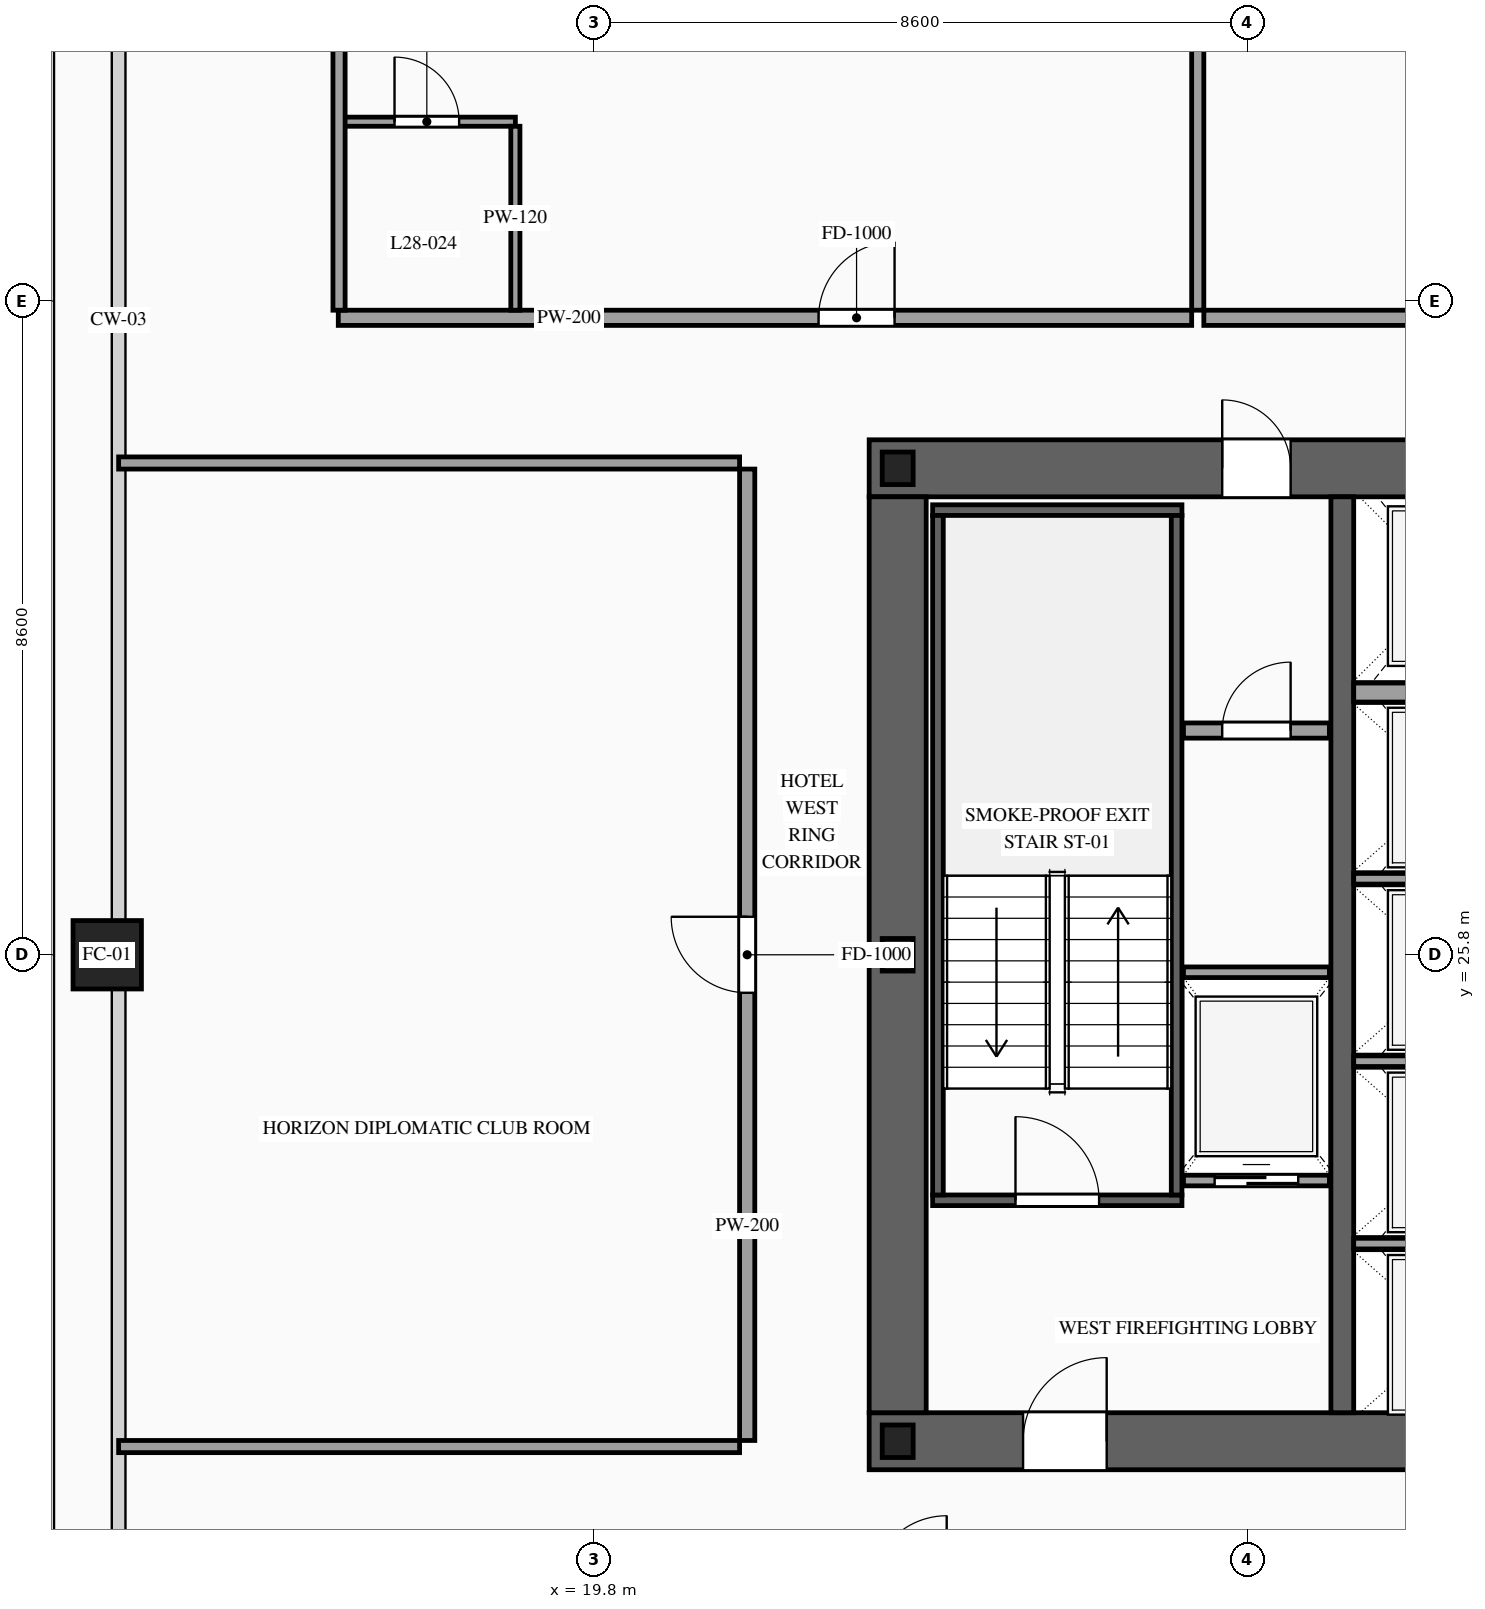
"""IFC4 building model, lengths in metres.
Left out: names, types, materials, properties, quantities, classifications, styles, units other than length and angle.
Written with IfcOpenShell. Run it as: python <this file> out.ifc"""

import sys

from ifc_helpers import new_model, si_unit, direction, frame, frame_2d, origin, origin_2d, place, context, subcontext, project, spatial, rectangle, hollow_rectangle, i_section, extrude, source, transform, mapped, element, fill, save


model = new_model("IFC4")
c1 = context("Model", 3, precision=1e-05, world=origin(), true_north=direction((0.0, 1.0)))
c2 = subcontext(c1, "Body", "Model", "MODEL_VIEW")
j1 = project(units=[si_unit("LENGTHUNIT", "METRE"), si_unit("PLANEANGLEUNIT", "RADIAN")], contexts=[c1])
p1 = place(None, origin())
s1 = spatial("IfcSite", under=j1, at=p1, CompositionType="ELEMENT")
p2 = place(p1, origin())
s2 = spatial("IfcBuilding", under=s1, at=p2, CompositionType="ELEMENT")
p3 = place(p2, frame((0.0, 0.0, 108.2)))
s3 = spatial("IfcBuildingStorey", under=s2, at=p3, CompositionType="ELEMENT", Elevation=108.2)
p4 = place(p3, frame((23.425, 19.4, 0.0), z_axis=(0.0, 0.0, 1.0), x_axis=(1.0, 0.0, 0.0)))
e1 = element("IfcWall", 1, at=p4, inside=s3, PredefinedType="SHEAR", context=c2, shape_type="SweptSolid", body=[
    extrude(rectangle(XDim=27.15, YDim=0.75, at=frame_2d((13.575, 0.0))), origin(), (0.0, 0.0, 1.0), 3.6),
])
p5 = place(p4, frame((2.025, 0.0, 0.0)))
e2 = element("IfcOpeningElement", 2, at=p5, cuts=e1, PredefinedType="OPENING", context=c2, shape_type="SweptSolid", body=[
    extrude(rectangle(XDim=1.1, YDim=2.2, at=frame_2d((0.55, 1.1))), frame((0.0, 0.39, 0.0), z_axis=(0.0, -1.0, 0.0), x_axis=(1.0, 0.0, 0.0)), (0.0, 0.0, 1.0), 0.78),
])
p6 = place(p4, frame((9.925, 0.0, 0.0)))
e3 = element("IfcOpeningElement", 3, at=p6, cuts=e1, PredefinedType="OPENING", context=c2, shape_type="SweptSolid", body=[
    extrude(rectangle(XDim=1.1, YDim=2.2, at=frame_2d((0.55, 1.1))), frame((0.0, 0.39, 0.0), z_axis=(0.0, -1.0, 0.0), x_axis=(1.0, 0.0, 0.0)), (0.0, 0.0, 1.0), 0.78),
])
p7 = place(p4, frame((23.125, 0.0, 0.0)))
e4 = element("IfcOpeningElement", 4, at=p7, cuts=e1, PredefinedType="OPENING", context=c2, shape_type="SweptSolid", body=[
    extrude(rectangle(XDim=1.1, YDim=2.2, at=frame_2d((0.55, 1.1))), frame((0.0, 0.39, 0.0), z_axis=(0.0, -1.0, 0.0), x_axis=(1.0, 0.0, 0.0)), (0.0, 0.0, 1.0), 0.78),
])
p8 = place(p4, frame((19.745, 0.0, 0.0)))
e5 = element("IfcOpeningElement", 5, at=p8, cuts=e1, PredefinedType="OPENING", context=c2, shape_type="SweptSolid", body=[
    extrude(rectangle(XDim=0.9, YDim=2.15, at=frame_2d((0.45, 1.075))), frame((0.0, 0.39, 0.0), z_axis=(0.0, -1.0, 0.0), x_axis=(1.0, 0.0, 0.0)), (0.0, 0.0, 1.0), 0.78),
])
p9 = place(p4, frame((18.305, 0.0, 0.0)))
e6 = element("IfcOpeningElement", 6, at=p9, cuts=e1, PredefinedType="OPENING", context=c2, shape_type="SweptSolid", body=[
    extrude(rectangle(XDim=0.9, YDim=2.15, at=frame_2d((0.45, 1.075))), frame((0.0, 0.39, 0.0), z_axis=(0.0, -1.0, 0.0), x_axis=(1.0, 0.0, 0.0)), (0.0, 0.0, 1.0), 0.78),
])
p10 = place(p3, frame((23.425, 32.2, 0.0), z_axis=(0.0, 0.0, 1.0), x_axis=(1.0, 0.0, 0.0)))
e7 = element("IfcWall", 7, at=p10, inside=s3, PredefinedType="SHEAR", context=c2, shape_type="SweptSolid", body=[
    extrude(rectangle(XDim=27.15, YDim=0.75, at=frame_2d((13.575, 0.0))), origin(), (0.0, 0.0, 1.0), 3.6),
])
p11 = place(p10, frame((4.645, 0.0, 0.0)))
e8 = element("IfcOpeningElement", 8, at=p11, cuts=e7, PredefinedType="OPENING", context=c2, shape_type="SweptSolid", body=[
    extrude(rectangle(XDim=0.9, YDim=2.15, at=frame_2d((0.45, 1.075))), frame((0.0, 0.39, 0.0), z_axis=(0.0, -1.0, 0.0), x_axis=(1.0, 0.0, 0.0)), (0.0, 0.0, 1.0), 0.78),
])
p12 = place(p10, frame((9.925, 0.0, 0.0)))
e9 = element("IfcOpeningElement", 9, at=p12, cuts=e7, PredefinedType="OPENING", context=c2, shape_type="SweptSolid", body=[
    extrude(rectangle(XDim=1.1, YDim=2.2, at=frame_2d((0.55, 1.1))), frame((0.0, 0.39, 0.0), z_axis=(0.0, -1.0, 0.0), x_axis=(1.0, 0.0, 0.0)), (0.0, 0.0, 1.0), 0.78),
])
p13 = place(p10, frame((15.775, 0.0, 0.0)))
e10 = element("IfcOpeningElement", 10, at=p13, cuts=e7, PredefinedType="OPENING", context=c2, shape_type="SweptSolid", body=[
    extrude(rectangle(XDim=1.1, YDim=2.2, at=frame_2d((0.55, 1.1))), frame((0.0, 0.39, 0.0), z_axis=(0.0, -1.0, 0.0), x_axis=(1.0, 0.0, 0.0)), (0.0, 0.0, 1.0), 0.78),
])
p14 = place(p10, frame((19.745, 0.0, 0.0)))
e11 = element("IfcOpeningElement", 11, at=p14, cuts=e7, PredefinedType="OPENING", context=c2, shape_type="SweptSolid", body=[
    extrude(rectangle(XDim=0.9, YDim=2.15, at=frame_2d((0.45, 1.075))), frame((0.0, 0.39, 0.0), z_axis=(0.0, -1.0, 0.0), x_axis=(1.0, 0.0, 0.0)), (0.0, 0.0, 1.0), 0.78),
])
m1 = source(origin(), c2, "Body", "SweptSolid", [
    extrude(rectangle(XDim=12.05, YDim=0.75, at=frame_2d((6.025, 0.0))), origin(), (0.0, 0.0, 1.0), 3.6),
])
p15 = place(p3, frame((23.8, 19.775, 0.0), z_axis=(0.0, 0.0, 1.0), x_axis=(0.0, 1.0, 0.0)))
e12 = element("IfcWall", 12, at=p15, inside=s3, PredefinedType="SHEAR", context=c2, shape_type="MappedRepresentation", body=[
    mapped(m1, transform((0.0, 0.0, 0.0), scale=1.0)),
])
m2 = source(origin(), c2, "Body", "SweptSolid", [
    extrude(rectangle(XDim=12.05, YDim=0.3, at=frame_2d((6.025, 0.0))), origin(), (0.0, 0.0, 1.0), 3.6),
])
p16 = place(p3, frame((29.65, 19.775, 0.0), z_axis=(0.0, 0.0, 1.0), x_axis=(0.0, 1.0, 0.0)))
e13 = element("IfcWall", 13, at=p16, inside=s3, PredefinedType="SOLIDWALL", context=c2, shape_type="MappedRepresentation", body=[
    mapped(m2, transform((0.0, 0.0, 0.0), scale=1.0)),
])
m3 = source(origin(), c2, "Body", "SweptSolid", [
    extrude(i_section(OverallWidth=0.407, OverallDepth=0.428, WebThickness=0.02, FlangeThickness=0.035, at=origin_2d()), origin(), (0.0, 0.0, 1.0), 3.6),
])
for number, where, z_axis, x_axis in (
    (14, (23.8, 19.4, 0.0), (0.0, 0.0, 1.0), (1.0, 0.0, 0.0)),
    (15, (23.8, 25.8, 0.0), (0.0, 0.0, 1.0), (1.0, 0.0, 0.0)),
    (16, (23.8, 32.2, 0.0), (0.0, 0.0, 1.0), (1.0, 0.0, 0.0)),
):
    element("IfcColumn", number, at=place(p3, frame(where, z_axis=z_axis, x_axis=x_axis)), inside=s3, PredefinedType="COLUMN", context=c2, shape_type="MappedRepresentation", body=[
        mapped(m3, transform((0.0, 0.0, 0.0), scale=1.0)),
    ])
m4 = source(origin(), c2, "Body", "SweptSolid", [
    extrude(hollow_rectangle(XDim=0.9, YDim=0.9, WallThickness=0.042, at=origin_2d()), origin(), (0.0, 0.0, 1.0), 3.6),
])
p17 = place(p3, frame((13.4, 25.8, 0.0), z_axis=(0.0, 0.0, 1.0), x_axis=(1.0, 0.0, 0.0)))
e17 = element("IfcColumn", 17, at=p17, inside=s3, PredefinedType="COLUMN", context=c2, shape_type="MappedRepresentation", body=[
    mapped(m4, transform((0.0, 0.0, 0.0), scale=1.0)),
])
p18 = place(p3, frame((27.56, 22.83, 0.0), z_axis=(0.0, 0.0, 1.0), x_axis=(1.0, 0.0, 0.0)))
e18 = element("IfcWall", 18, at=p18, inside=s3, PredefinedType="SOLIDWALL", context=c2, shape_type="SweptSolid", body=[
    extrude(rectangle(XDim=1.92, YDim=0.14, at=frame_2d((0.96, 0.0))), origin(), (0.0, 0.0, 1.0), 3.38),
])
p19 = place(p18, frame((0.41, 0.0, 0.0)))
e19 = element("IfcOpeningElement", 19, at=p19, cuts=e18, PredefinedType="OPENING", context=c2, shape_type="SweptSolid", body=[
    extrude(rectangle(XDim=1.1, YDim=2.2, at=frame_2d((0.55, 1.1))), frame((0.0, 0.085, 0.0), z_axis=(0.0, -1.0, 0.0), x_axis=(1.0, 0.0, 0.0)), (0.0, 0.0, 1.0), 0.17),
])
m5 = source(origin(), c2, "Body", "SweptSolid", [
    extrude(rectangle(XDim=1.92, YDim=0.14, at=frame_2d((0.96, 0.0))), origin(), (0.0, 0.0, 1.0), 3.38),
])
p20 = place(p3, frame((27.56, 25.57, 0.0), z_axis=(0.0, 0.0, 1.0), x_axis=(1.0, 0.0, 0.0)))
e20 = element("IfcWall", 20, at=p20, inside=s3, PredefinedType="SOLIDWALL", context=c2, shape_type="MappedRepresentation", body=[
    mapped(m5, transform((0.0, 0.0, 0.0), scale=1.0)),
])
m6 = source(origin(), c2, "Body", "SweptSolid", [
    extrude(rectangle(XDim=2.5, YDim=0.14, at=frame_2d((1.25, 0.0))), origin(), (0.0, 0.0, 1.0), 3.38),
])
for number, where, z_axis, x_axis in (
    (21, (29.8, 22.0, 0.0), (0.0, 0.0, 1.0), (1.0, 0.0, 0.0)),
    (22, (29.8, 24.4, 0.0), (0.0, 0.0, 1.0), (1.0, 0.0, 0.0)),
    (23, (29.8, 26.8, 0.0), (0.0, 0.0, 1.0), (1.0, 0.0, 0.0)),
):
    element("IfcWall", number, at=place(p3, frame(where, z_axis=z_axis, x_axis=x_axis)), inside=s3, PredefinedType="SOLIDWALL", context=c2, shape_type="MappedRepresentation", body=[
        mapped(m6, transform((0.0, 0.0, 0.0), scale=1.0)),
    ])
m7 = source(origin(), c2, "Body", "SweptSolid", [
    extrude(rectangle(XDim=2.5, YDim=0.25, at=frame_2d((1.25, 0.0))), origin(), (0.0, 0.0, 1.0), 3.38),
])
p21 = place(p3, frame((29.8, 29.25, 0.0), z_axis=(0.0, 0.0, 1.0), x_axis=(1.0, 0.0, 0.0)))
e24 = element("IfcWall", 24, at=p21, inside=s3, PredefinedType="SOLIDWALL", context=c2, shape_type="MappedRepresentation", body=[
    mapped(m7, transform((0.0, 0.0, 0.0), scale=1.0)),
])
p22 = place(p3, frame((24.26, 22.57, 0.0), z_axis=(0.0, 0.0, 1.0), x_axis=(1.0, 0.0, 0.0)))
e25 = element("IfcWall", 25, at=p22, inside=s3, PredefinedType="SOLIDWALL", context=c2, shape_type="SweptSolid", body=[
    extrude(rectangle(XDim=3.28, YDim=0.14, at=frame_2d((1.64, 0.0))), origin(), (0.0, 0.0, 1.0), 3.38),
])
p23 = place(p22, frame((1.09, 0.0, 0.0)))
e26 = element("IfcOpeningElement", 26, at=p23, cuts=e25, PredefinedType="OPENING", context=c2, shape_type="SweptSolid", body=[
    extrude(rectangle(XDim=1.1, YDim=2.2, at=frame_2d((0.55, 1.1))), frame((0.0, 0.085, 0.0), z_axis=(0.0, -1.0, 0.0), x_axis=(1.0, 0.0, 0.0)), (0.0, 0.0, 1.0), 0.17),
])
m8 = source(origin(), c2, "Body", "SweptSolid", [
    extrude(rectangle(XDim=3.28, YDim=0.14, at=frame_2d((1.64, 0.0))), origin(), (0.0, 0.0, 1.0), 3.38),
])
p24 = place(p3, frame((24.26, 31.65, 0.0), z_axis=(0.0, 0.0, 1.0), x_axis=(1.0, 0.0, 0.0)))
e27 = element("IfcWall", 27, at=p24, inside=s3, PredefinedType="SOLIDWALL", context=c2, shape_type="MappedRepresentation", body=[
    mapped(m8, transform((0.0, 0.0, 0.0), scale=1.0)),
])
m9 = source(origin(), c2, "Body", "SweptSolid", [
    extrude(rectangle(XDim=8.94, YDim=0.14, at=frame_2d((4.47, 0.0))), origin(), (0.0, 0.0, 1.0), 3.38),
])
for number, where, z_axis, x_axis in (
    (28, (24.33, 22.64, 0.0), (0.0, 0.0, 1.0), (0.0, 1.0, 0.0)),
    (29, (27.47, 22.64, 0.0), (0.0, 0.0, 1.0), (0.0, 1.0, 0.0)),
):
    element("IfcWall", number, at=place(p3, frame(where, z_axis=z_axis, x_axis=x_axis)), inside=s3, PredefinedType="SOLIDWALL", context=c2, shape_type="MappedRepresentation", body=[
        mapped(m9, transform((0.0, 0.0, 0.0), scale=1.0)),
    ])
p25 = place(p3, frame((27.56, 28.75, 0.0), z_axis=(0.0, 0.0, 1.0), x_axis=(1.0, 0.0, 0.0)))
e30 = element("IfcWall", 30, at=p25, inside=s3, PredefinedType="PARTITIONING", context=c2, shape_type="SweptSolid", body=[
    extrude(rectangle(XDim=1.92, YDim=0.2, at=frame_2d((0.96, 0.0))), origin(), (0.0, 0.0, 1.0), 3.38),
])
p26 = place(p25, frame((0.51, 0.0, 0.0)))
e31 = element("IfcOpeningElement", 31, at=p26, cuts=e30, PredefinedType="OPENING", context=c2, shape_type="SweptSolid", body=[
    extrude(rectangle(XDim=0.9, YDim=2.15, at=frame_2d((0.45, 1.075))), frame((0.0, 0.115, 0.0), z_axis=(0.0, -1.0, 0.0), x_axis=(1.0, 0.0, 0.0)), (0.0, 0.0, 1.0), 0.23),
])
p27 = place(p3, frame((16.44, 34.18, 0.0), z_axis=(0.0, 0.0, 1.0), x_axis=(1.0, 0.0, 0.0)))
e32 = element("IfcWall", 32, at=p27, inside=s3, PredefinedType="PARTITIONING", context=c2, shape_type="SweptSolid", body=[
    extrude(rectangle(XDim=11.228, YDim=0.2, at=frame_2d((5.614, 0.0))), origin(), (0.0, 0.0, 1.0), 3.38),
])
p28 = place(p27, frame((6.319, 0.0, 0.0)))
e33 = element("IfcOpeningElement", 33, at=p28, cuts=e32, PredefinedType="OPENING", context=c2, shape_type="SweptSolid", body=[
    extrude(rectangle(XDim=1.0, YDim=2.2, at=frame_2d((0.5, 1.1))), frame((0.0, 0.115, 0.0), z_axis=(0.0, -1.0, 0.0), x_axis=(1.0, 0.0, 0.0)), (0.0, 0.0, 1.0), 0.23),
])
m10 = source(origin(), c2, "Body", "SweptSolid", [
    extrude(rectangle(XDim=14.97, YDim=0.16, at=frame_2d((7.485, 0.0))), origin(), (0.0, 0.0, 1.0), 3.38),
])
p29 = place(p3, frame((27.748, 34.28, 0.0), z_axis=(0.0, 0.0, 1.0), x_axis=(0.0, 1.0, 0.0)))
e34 = element("IfcWall", 34, at=p29, inside=s3, PredefinedType="PARTITIONING", context=c2, shape_type="MappedRepresentation", body=[
    mapped(m10, transform((0.0, 0.0, 0.0), scale=1.0)),
])
p30 = place(p3, frame((16.44, 36.76, 0.0), z_axis=(0.0, 0.0, 1.0), x_axis=(1.0, 0.0, 0.0)))
e35 = element("IfcWall", 35, at=p30, inside=s3, PredefinedType="PARTITIONING", context=c2, shape_type="SweptSolid", body=[
    extrude(rectangle(XDim=2.33, YDim=0.12, at=frame_2d((1.165, 0.0))), origin(), (0.0, 0.0, 1.0), 3.38),
])
p31 = place(p30, frame((0.74, 0.0, 0.0)))
e36 = element("IfcOpeningElement", 36, at=p31, cuts=e35, PredefinedType="OPENING", context=c2, shape_type="SweptSolid", body=[
    extrude(rectangle(XDim=0.85, YDim=2.1, at=frame_2d((0.425, 1.05))), frame((0.0, 0.075, 0.0), z_axis=(0.0, -1.0, 0.0), x_axis=(1.0, 0.0, 0.0)), (0.0, 0.0, 1.0), 0.15),
])
m11 = source(origin(), c2, "Body", "SweptSolid", [
    extrude(rectangle(XDim=2.42, YDim=0.12, at=frame_2d((1.21, 0.0))), origin(), (0.0, 0.0, 1.0), 3.38),
])
p32 = place(p3, frame((18.77, 34.28, 0.0), z_axis=(0.0, 0.0, 1.0), x_axis=(0.0, 1.0, 0.0)))
e37 = element("IfcWall", 37, at=p32, inside=s3, PredefinedType="PARTITIONING", context=c2, shape_type="MappedRepresentation", body=[
    mapped(m11, transform((0.0, 0.0, 0.0), scale=1.0)),
])
p33 = place(p3, frame((27.828, 34.18, 0.0), z_axis=(0.0, 0.0, 1.0), x_axis=(1.0, 0.0, 0.0)))
e38 = element("IfcWall", 38, at=p33, inside=s3, PredefinedType="PARTITIONING", context=c2, shape_type="SweptSolid", body=[
    extrude(rectangle(XDim=9.092, YDim=0.2, at=frame_2d((4.546, 0.0))), origin(), (0.0, 0.0, 1.0), 3.38),
])
p34 = place(p33, frame((4.046, 0.0, 0.0)))
e39 = element("IfcOpeningElement", 39, at=p34, cuts=e38, PredefinedType="OPENING", context=c2, shape_type="SweptSolid", body=[
    extrude(rectangle(XDim=1.0, YDim=2.2, at=frame_2d((0.5, 1.1))), frame((0.0, 0.115, 0.0), z_axis=(0.0, -1.0, 0.0), x_axis=(1.0, 0.0, 0.0)), (0.0, 0.0, 1.0), 0.23),
])
m12 = source(origin(), c2, "Body", "SweptSolid", [
    extrude(rectangle(XDim=14.82, YDim=0.16, at=frame_2d((7.41, 0.0))), origin(), (0.0, 0.0, 1.0), 3.38),
])
p35 = place(p3, frame((16.45, 34.28, 0.0), z_axis=(0.0, 0.0, 1.0), x_axis=(0.0, 1.0, 0.0)))
e40 = element("IfcWall", 40, at=p35, inside=s3, PredefinedType="PARTITIONING", context=c2, shape_type="MappedRepresentation", body=[
    mapped(m12, transform((0.0, 0.0, 0.0), scale=1.0)),
])
p36 = place(p3, frame((21.82, 19.41, 0.0), z_axis=(0.0, 0.0, 1.0), x_axis=(0.0, 1.0, 0.0)))
e41 = element("IfcWall", 41, at=p36, inside=s3, PredefinedType="PARTITIONING", context=c2, shape_type="SweptSolid", body=[
    extrude(rectangle(XDim=12.78, YDim=0.2, at=frame_2d((6.39, 0.0))), origin(), (0.0, 0.0, 1.0), 3.38),
])
p37 = place(p36, frame((5.89, 0.0, 0.0)))
e42 = element("IfcOpeningElement", 42, at=p37, cuts=e41, PredefinedType="OPENING", context=c2, shape_type="SweptSolid", body=[
    extrude(rectangle(XDim=1.0, YDim=2.2, at=frame_2d((0.5, 1.1))), frame((0.0, 0.115, 0.0), z_axis=(0.0, -1.0, 0.0), x_axis=(1.0, 0.0, 0.0)), (0.0, 0.0, 1.0), 0.23),
])
m13 = source(origin(), c2, "Body", "SweptSolid", [
    extrude(rectangle(XDim=8.17, YDim=0.16, at=frame_2d((4.085, 0.0))), origin(), (0.0, 0.0, 1.0), 2.875),
])
for number, where, z_axis, x_axis in (
    (43, (13.55, 19.33, 0.0), (0.0, 0.0, 1.0), (1.0, 0.0, 0.0)),
    (44, (13.55, 32.27, 0.0), (0.0, 0.0, 1.0), (1.0, 0.0, 0.0)),
):
    element("IfcWall", number, at=place(p3, frame(where, z_axis=z_axis, x_axis=x_axis)), inside=s3, PredefinedType="PARTITIONING", context=c2, shape_type="MappedRepresentation", body=[
        mapped(m13, transform((0.0, 0.0, 0.0), scale=1.0)),
    ])
m14 = source(origin(), c2, "Body", "SweptSolid", [
    extrude(rectangle(XDim=1.1, YDim=2.2, at=frame_2d((0.55, 1.1))), frame((0.0, 0.025, 0.0), z_axis=(0.0, -1.0, 0.0), x_axis=(1.0, 0.0, 0.0)), (0.0, 0.0, 1.0), 0.05),
])
p38 = place(p19, origin())
e45 = element("IfcDoor", 45, at=p38, inside=s3, OperationType="SLIDING_TO_LEFT", PredefinedType="DOOR", context=c2, shape_type="MappedRepresentation", body=[
    mapped(m14, transform((0.0, 0.0, 0.0), scale=1.0)),
])
fill(e19, e45)
m15 = source(origin(), c2, "Body", "SweptSolid", [
    extrude(rectangle(XDim=1.1, YDim=2.2, at=frame_2d((0.55, 1.1))), frame((0.0, 0.025, 0.0), z_axis=(0.0, -1.0, 0.0), x_axis=(1.0, 0.0, 0.0)), (0.0, 0.0, 1.0), 0.05),
])
p39 = place(p23, origin())
e46 = element("IfcDoor", 46, at=p39, inside=s3, OperationType="SINGLE_SWING_LEFT", PredefinedType="DOOR", context=c2, shape_type="MappedRepresentation", body=[
    mapped(m15, transform((0.0, 0.0, 0.0), scale=1.0)),
])
fill(e26, e46)
p40 = place(p5, origin())
e47 = element("IfcDoor", 47, at=p40, inside=s3, OperationType="SINGLE_SWING_RIGHT", PredefinedType="DOOR", context=c2, shape_type="MappedRepresentation", body=[
    mapped(m15, transform((0.0, 0.0, 0.0), scale=1.0)),
])
fill(e2, e47)
m16 = source(origin(), c2, "Body", "SweptSolid", [
    extrude(rectangle(XDim=0.9, YDim=2.15, at=frame_2d((0.45, 1.075))), frame((0.0, 0.025, 0.0), z_axis=(0.0, -1.0, 0.0), x_axis=(1.0, 0.0, 0.0)), (0.0, 0.0, 1.0), 0.05),
])
p41 = place(p11, origin())
e48 = element("IfcDoor", 48, at=p41, inside=s3, OperationType="SINGLE_SWING_LEFT", PredefinedType="DOOR", context=c2, shape_type="MappedRepresentation", body=[
    mapped(m16, transform((0.0, 0.0, 0.0), scale=1.0)),
])
fill(e8, e48)
p42 = place(p26, origin())
e49 = element("IfcDoor", 49, at=p42, inside=s3, OperationType="SINGLE_SWING_RIGHT", PredefinedType="DOOR", context=c2, shape_type="MappedRepresentation", body=[
    mapped(m16, transform((0.0, 0.0, 0.0), scale=1.0)),
])
fill(e31, e49)
m17 = source(origin(), c2, "Body", "SweptSolid", [
    extrude(rectangle(XDim=1.0, YDim=2.2, at=frame_2d((0.5, 1.1))), frame((0.0, 0.025, 0.0), z_axis=(0.0, -1.0, 0.0), x_axis=(1.0, 0.0, 0.0)), (0.0, 0.0, 1.0), 0.05),
])
p43 = place(p28, origin())
e50 = element("IfcDoor", 50, at=p43, inside=s3, OperationType="SINGLE_SWING_RIGHT", PredefinedType="DOOR", context=c2, shape_type="MappedRepresentation", body=[
    mapped(m17, transform((0.0, 0.0, 0.0), scale=1.0)),
])
fill(e33, e50)
m18 = source(origin(), c2, "Body", "SweptSolid", [
    extrude(rectangle(XDim=0.85, YDim=2.1, at=frame_2d((0.425, 1.05))), frame((0.0, 0.025, 0.0), z_axis=(0.0, -1.0, 0.0), x_axis=(1.0, 0.0, 0.0)), (0.0, 0.0, 1.0), 0.05),
])
p44 = place(p31, origin())
e51 = element("IfcDoor", 51, at=p44, inside=s3, OperationType="SINGLE_SWING_LEFT", PredefinedType="DOOR", context=c2, shape_type="MappedRepresentation", body=[
    mapped(m18, transform((0.0, 0.0, 0.0), scale=1.0)),
])
fill(e36, e51)
p45 = place(p37, origin())
e52 = element("IfcDoor", 52, at=p45, inside=s3, OperationType="SINGLE_SWING_RIGHT", PredefinedType="DOOR", context=c2, shape_type="MappedRepresentation", body=[
    mapped(m17, transform((0.0, 0.0, 0.0), scale=1.0)),
])
fill(e42, e52)
save(model, sys.argv[1])
